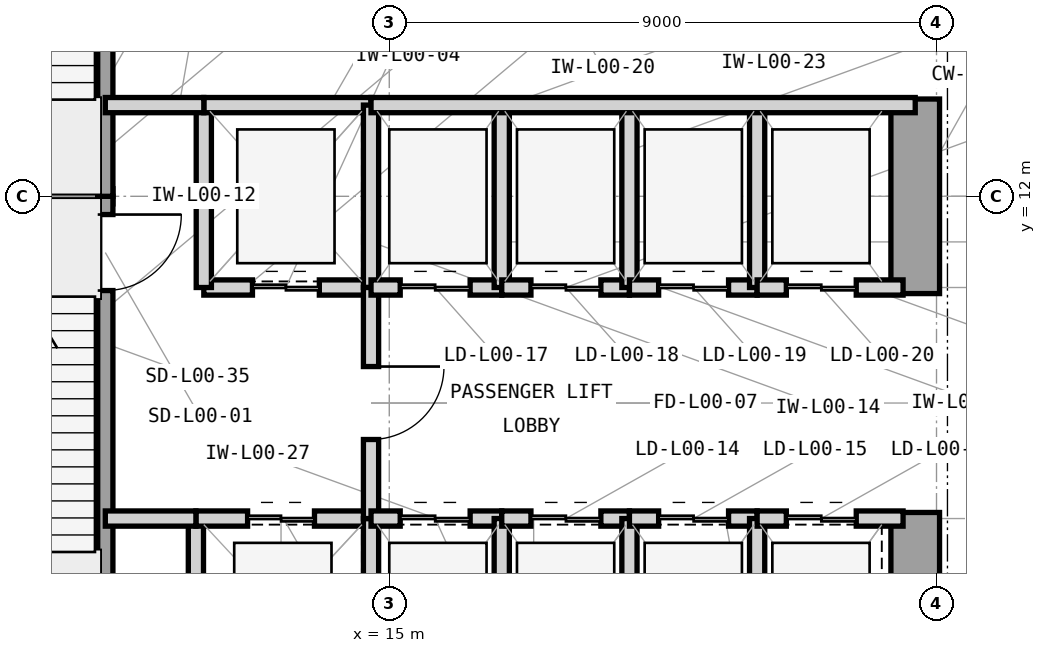
"""IFC4 building model, lengths in metres.
Left out: names, types, materials, properties, quantities, classifications, styles, units other than length and angle.
Written with IfcOpenShell. Run it as: python <this file> out.ifc"""

import sys

from ifc_helpers import new_model, si_unit, direction, frame, frame_2d, origin, place, context, subcontext, project, spatial, rectangle, extrude, element, fill, save


model = new_model("IFC4")
c1 = context("Model", 3, precision=1e-05, world=origin(), true_north=direction((0.0, 1.0)))
c2 = subcontext(c1, "Body", "Model", "MODEL_VIEW")
j1 = project(units=[si_unit("LENGTHUNIT", "METRE"), si_unit("PLANEANGLEUNIT", "RADIAN")], contexts=[c1])
p1 = place(None, origin())
s1 = spatial("IfcSite", under=j1, at=p1, CompositionType="ELEMENT")
p2 = place(p1, origin())
s2 = spatial("IfcBuilding", under=s1, at=p2, CompositionType="ELEMENT")
p3 = place(p2, origin())
s3 = spatial("IfcBuildingStorey", under=s2, at=p3, CompositionType="ELEMENT", Elevation=0.0)
p4 = place(p3, frame((23.65, 3.75, 0.0), z_axis=(0.0, 0.0, 1.0), x_axis=(0.0, 1.0, 0.0)))
e1 = element("IfcWall", 1, at=p4, inside=s3, PredefinedType="SHEAR", context=c2, shape_type="SweptSolid", body=[
    extrude(rectangle(XDim=3.05, YDim=0.8, at=frame_2d((1.525, 0.0))), origin(), (0.0, 0.0, 1.0), 5.4),
])
p5 = place(p3, frame((23.65, 10.4, 0.0), z_axis=(0.0, 0.0, 1.0), x_axis=(0.0, 1.0, 0.0)))
e2 = element("IfcWall", 2, at=p5, inside=s3, PredefinedType="SHEAR", context=c2, shape_type="SweptSolid", body=[
    extrude(rectangle(XDim=3.2, YDim=0.8, at=frame_2d((1.6, 0.0))), origin(), (0.0, 0.0, 1.0), 5.4),
])
p6 = place(p3, frame((6.35, 12.0, 0.0), z_axis=(0.0, 0.0, 1.0), x_axis=(1.0, 0.0, 0.0)))
e3 = element("IfcWall", 3, at=p6, inside=s3, PredefinedType="SHEAR", context=c2, shape_type="SweptSolid", body=[
    extrude(rectangle(XDim=4.105, YDim=0.25, at=frame_2d((2.052, 0.0))), origin(), (0.0, 0.0, 1.0), 5.4),
])
p7 = place(p3, frame((10.33, 4.55, 0.0), z_axis=(0.0, 0.0, 1.0), x_axis=(0.0, 1.0, 0.0)))
e4 = element("IfcWall", 4, at=p7, inside=s3, PredefinedType="SHEAR", context=c2, shape_type="SweptSolid", body=[
    extrude(rectangle(XDim=7.45, YDim=0.25, at=frame_2d((3.725, 0.0))), origin(), (0.0, 0.0, 1.0), 5.4),
])
p8 = place(p7, frame((5.9, 0.0, 0.0)))
e5 = element("IfcOpeningElement", 5, at=p8, cuts=e4, PredefinedType="OPENING", context=c2, shape_type="SweptSolid", body=[
    extrude(rectangle(XDim=1.25, YDim=2.2, at=frame_2d((0.625, 1.1))), frame((0.0, 0.135, 0.0), z_axis=(0.0, -1.0, 0.0), x_axis=(1.0, 0.0, 0.0)), (0.0, 0.0, 1.0), 0.27),
])
p9 = place(p3, frame((10.33, 12.0, 0.0), z_axis=(0.0, 0.0, 1.0), x_axis=(0.0, 1.0, 0.0)))
e6 = element("IfcWall", 6, at=p9, inside=s3, PredefinedType="SHEAR", context=c2, shape_type="SweptSolid", body=[
    extrude(rectangle(XDim=7.45, YDim=0.25, at=frame_2d((3.725, 0.0))), origin(), (0.0, 0.0, 1.0), 5.4),
])
p10 = place(p9, frame((5.85, 0.0, 0.0)))
e7 = element("IfcOpeningElement", 7, at=p10, cuts=e6, PredefinedType="OPENING", context=c2, shape_type="SweptSolid", body=[
    extrude(rectangle(XDim=1.25, YDim=2.2, at=frame_2d((0.625, 1.1))), frame((0.0, 0.135, 0.0), z_axis=(0.0, -1.0, 0.0), x_axis=(1.0, 0.0, 0.0)), (0.0, 0.0, 1.0), 0.27),
])
p11 = place(p3, frame((11.82, 3.35, 0.0), z_axis=(0.0, 0.0, 1.0), x_axis=(0.0, 1.0, 0.0)))
e8 = element("IfcWall", 8, at=p11, inside=s3, PredefinedType="PARTITIONING", context=c2, shape_type="SweptSolid", body=[
    extrude(rectangle(XDim=3.35, YDim=0.25, at=frame_2d((1.675, 0.0))), origin(), (0.0, 0.0, 1.0), 5.09),
])
p12 = place(p3, frame((11.82, 6.7, 0.0), z_axis=(0.0, 0.0, 1.0), x_axis=(1.0, 0.0, 0.0)))
e9 = element("IfcWall", 9, at=p12, inside=s3, PredefinedType="PARTITIONING", context=c2, shape_type="SweptSolid", body=[
    extrude(rectangle(XDim=2.88, YDim=0.25, at=frame_2d((1.44, 0.0))), origin(), (0.0, 0.0, 1.0), 4.473),
])
p13 = place(p12, frame((0.85, 0.0, 0.0)))
e10 = element("IfcOpeningElement", 10, at=p13, cuts=e9, PredefinedType="OPENING", context=c2, shape_type="SweptSolid", body=[
    extrude(rectangle(XDim=1.1, YDim=2.25, at=frame_2d((0.55, 1.125))), frame((0.0, 0.135, 0.0), z_axis=(0.0, -1.0, 0.0), x_axis=(1.0, 0.0, 0.0)), (0.0, 0.0, 1.0), 0.27),
])
p14 = place(p3, frame((14.7, 3.35, 0.0), z_axis=(0.0, 0.0, 1.0), x_axis=(0.0, 1.0, 0.0)))
e11 = element("IfcWall", 11, at=p14, inside=s3, PredefinedType="PARTITIONING", context=c2, shape_type="SweptSolid", body=[
    extrude(rectangle(XDim=3.35, YDim=0.25, at=frame_2d((1.675, 0.0))), origin(), (0.0, 0.0, 1.0), 5.09),
])
p15 = place(p3, frame((11.95, 10.5, 0.0), z_axis=(0.0, 0.0, 1.0), x_axis=(1.0, 0.0, 0.0)))
e12 = element("IfcWall", 12, at=p15, inside=s3, PredefinedType="PARTITIONING", context=c2, shape_type="SweptSolid", body=[
    extrude(rectangle(XDim=2.75, YDim=0.25, at=frame_2d((1.375, 0.0))), origin(), (0.0, 0.0, 1.0), 4.473),
])
p16 = place(p15, frame((0.8, 0.0, 0.0)))
e13 = element("IfcOpeningElement", 13, at=p16, cuts=e12, PredefinedType="OPENING", context=c2, shape_type="SweptSolid", body=[
    extrude(rectangle(XDim=1.1, YDim=2.25, at=frame_2d((0.55, 1.125))), frame((0.0, 0.135, 0.0), z_axis=(0.0, -1.0, 0.0), x_axis=(1.0, 0.0, 0.0)), (0.0, 0.0, 1.0), 0.27),
])
p17 = place(p3, frame((11.95, 10.5, 0.0), z_axis=(0.0, 0.0, 1.0), x_axis=(0.0, 1.0, 0.0)))
e14 = element("IfcWall", 14, at=p17, inside=s3, PredefinedType="PARTITIONING", context=c2, shape_type="SweptSolid", body=[
    extrude(rectangle(XDim=3.0, YDim=0.25, at=frame_2d((1.5, 0.0))), origin(), (0.0, 0.0, 1.0), 5.09),
])
p18 = place(p3, frame((11.95, 13.5, 0.0), z_axis=(0.0, 0.0, 1.0), x_axis=(1.0, 0.0, 0.0)))
e15 = element("IfcWall", 15, at=p18, inside=s3, PredefinedType="PARTITIONING", context=c2, shape_type="SweptSolid", body=[
    extrude(rectangle(XDim=2.75, YDim=0.25, at=frame_2d((1.375, 0.0))), origin(), (0.0, 0.0, 1.0), 4.473),
])
p19 = place(p3, frame((14.7, 10.5, 0.0), z_axis=(0.0, 0.0, 1.0), x_axis=(0.0, 1.0, 0.0)))
e16 = element("IfcWall", 16, at=p19, inside=s3, PredefinedType="PARTITIONING", context=c2, shape_type="SweptSolid", body=[
    extrude(rectangle(XDim=3.0, YDim=0.25, at=frame_2d((1.5, 0.0))), origin(), (0.0, 0.0, 1.0), 5.09),
])
p20 = place(p3, frame((14.7, 6.7, 0.0), z_axis=(0.0, 0.0, 1.0), x_axis=(0.0, 1.0, 0.0)))
e17 = element("IfcWall", 17, at=p20, inside=s3, PredefinedType="PARTITIONING", context=c2, shape_type="SweptSolid", body=[
    extrude(rectangle(XDim=3.8, YDim=0.25, at=frame_2d((1.9, 0.0))), origin(), (0.0, 0.0, 1.0), 5.09),
])
p21 = place(p20, frame((1.3, 0.0, 0.0)))
e18 = element("IfcOpeningElement", 18, at=p21, cuts=e17, PredefinedType="OPENING", context=c2, shape_type="SweptSolid", body=[
    extrude(rectangle(XDim=1.2, YDim=2.2, at=frame_2d((0.6, 1.1))), frame((0.0, 0.135, 0.0), z_axis=(0.0, -1.0, 0.0), x_axis=(1.0, 0.0, 0.0)), (0.0, 0.0, 1.0), 0.27),
])
p22 = place(p3, frame((10.33, 13.5, 0.0), z_axis=(0.0, 0.0, 1.0), x_axis=(1.0, 0.0, 0.0)))
e19 = element("IfcWall", 19, at=p22, inside=s3, PredefinedType="PARTITIONING", context=c2, shape_type="SweptSolid", body=[
    extrude(rectangle(XDim=1.62, YDim=0.25, at=frame_2d((0.81, 0.0))), origin(), (0.0, 0.0, 1.0), 4.473),
])
p23 = place(p3, frame((10.33, 6.7, 0.0), z_axis=(0.0, 0.0, 1.0), x_axis=(1.0, 0.0, 0.0)))
e20 = element("IfcWall", 20, at=p23, inside=s3, PredefinedType="PARTITIONING", context=c2, shape_type="SweptSolid", body=[
    extrude(rectangle(XDim=1.49, YDim=0.25, at=frame_2d((0.745, 0.0))), origin(), (0.0, 0.0, 1.0), 4.473),
])
p24 = place(p3, frame((14.7, 6.7, 0.0), z_axis=(0.0, 0.0, 1.0), x_axis=(1.0, 0.0, 0.0)))
e21 = element("IfcWall", 21, at=p24, inside=s3, PredefinedType="PARTITIONING", context=c2, shape_type="SweptSolid", body=[
    extrude(rectangle(XDim=2.15, YDim=0.25, at=frame_2d((1.075, 0.0))), origin(), (0.0, 0.0, 1.0), 4.473),
])
p25 = place(p24, frame((0.48, 0.0, 0.0)))
e22 = element("IfcOpeningElement", 22, at=p25, cuts=e21, PredefinedType="OPENING", context=c2, shape_type="SweptSolid", body=[
    extrude(rectangle(XDim=1.15, YDim=2.25, at=frame_2d((0.575, 1.125))), frame((0.0, 0.135, 0.0), z_axis=(0.0, -1.0, 0.0), x_axis=(1.0, 0.0, 0.0)), (0.0, 0.0, 1.0), 0.27),
])
p26 = place(p3, frame((16.85, 3.35, 0.0), z_axis=(0.0, 0.0, 1.0), x_axis=(0.0, 1.0, 0.0)))
e23 = element("IfcWall", 23, at=p26, inside=s3, PredefinedType="PARTITIONING", context=c2, shape_type="SweptSolid", body=[
    extrude(rectangle(XDim=3.35, YDim=0.25, at=frame_2d((1.675, 0.0))), origin(), (0.0, 0.0, 1.0), 5.09),
])
p27 = place(p3, frame((16.85, 6.7, 0.0), z_axis=(0.0, 0.0, 1.0), x_axis=(1.0, 0.0, 0.0)))
e24 = element("IfcWall", 24, at=p27, inside=s3, PredefinedType="PARTITIONING", context=c2, shape_type="SweptSolid", body=[
    extrude(rectangle(XDim=2.1, YDim=0.25, at=frame_2d((1.05, 0.0))), origin(), (0.0, 0.0, 1.0), 4.473),
])
p28 = place(p27, frame((0.48, 0.0, 0.0)))
e25 = element("IfcOpeningElement", 25, at=p28, cuts=e24, PredefinedType="OPENING", context=c2, shape_type="SweptSolid", body=[
    extrude(rectangle(XDim=1.15, YDim=2.25, at=frame_2d((0.575, 1.125))), frame((0.0, 0.135, 0.0), z_axis=(0.0, -1.0, 0.0), x_axis=(1.0, 0.0, 0.0)), (0.0, 0.0, 1.0), 0.27),
])
p29 = place(p3, frame((18.95, 3.35, 0.0), z_axis=(0.0, 0.0, 1.0), x_axis=(0.0, 1.0, 0.0)))
e26 = element("IfcWall", 26, at=p29, inside=s3, PredefinedType="PARTITIONING", context=c2, shape_type="SweptSolid", body=[
    extrude(rectangle(XDim=3.35, YDim=0.25, at=frame_2d((1.675, 0.0))), origin(), (0.0, 0.0, 1.0), 5.09),
])
p30 = place(p3, frame((18.95, 6.7, 0.0), z_axis=(0.0, 0.0, 1.0), x_axis=(1.0, 0.0, 0.0)))
e27 = element("IfcWall", 27, at=p30, inside=s3, PredefinedType="PARTITIONING", context=c2, shape_type="SweptSolid", body=[
    extrude(rectangle(XDim=2.1, YDim=0.25, at=frame_2d((1.05, 0.0))), origin(), (0.0, 0.0, 1.0), 4.473),
])
p31 = place(p30, frame((0.48, 0.0, 0.0)))
e28 = element("IfcOpeningElement", 28, at=p31, cuts=e27, PredefinedType="OPENING", context=c2, shape_type="SweptSolid", body=[
    extrude(rectangle(XDim=1.15, YDim=2.25, at=frame_2d((0.575, 1.125))), frame((0.0, 0.135, 0.0), z_axis=(0.0, -1.0, 0.0), x_axis=(1.0, 0.0, 0.0)), (0.0, 0.0, 1.0), 0.27),
])
p32 = place(p3, frame((21.05, 3.35, 0.0), z_axis=(0.0, 0.0, 1.0), x_axis=(0.0, 1.0, 0.0)))
e29 = element("IfcWall", 29, at=p32, inside=s3, PredefinedType="PARTITIONING", context=c2, shape_type="SweptSolid", body=[
    extrude(rectangle(XDim=3.35, YDim=0.25, at=frame_2d((1.675, 0.0))), origin(), (0.0, 0.0, 1.0), 5.09),
])
p33 = place(p3, frame((21.05, 6.7, 0.0), z_axis=(0.0, 0.0, 1.0), x_axis=(1.0, 0.0, 0.0)))
e30 = element("IfcWall", 30, at=p33, inside=s3, PredefinedType="PARTITIONING", context=c2, shape_type="SweptSolid", body=[
    extrude(rectangle(XDim=2.4, YDim=0.25, at=frame_2d((1.2, 0.0))), origin(), (0.0, 0.0, 1.0), 4.473),
])
p34 = place(p33, frame((0.48, 0.0, 0.0)))
e31 = element("IfcOpeningElement", 31, at=p34, cuts=e30, PredefinedType="OPENING", context=c2, shape_type="SweptSolid", body=[
    extrude(rectangle(XDim=1.15, YDim=2.25, at=frame_2d((0.575, 1.125))), frame((0.0, 0.135, 0.0), z_axis=(0.0, -1.0, 0.0), x_axis=(1.0, 0.0, 0.0)), (0.0, 0.0, 1.0), 0.27),
])
p35 = place(p3, frame((14.7, 10.5, 0.0), z_axis=(0.0, 0.0, 1.0), x_axis=(1.0, 0.0, 0.0)))
e32 = element("IfcWall", 32, at=p35, inside=s3, PredefinedType="PARTITIONING", context=c2, shape_type="SweptSolid", body=[
    extrude(rectangle(XDim=2.15, YDim=0.25, at=frame_2d((1.075, 0.0))), origin(), (0.0, 0.0, 1.0), 4.473),
])
p36 = place(p35, frame((0.48, 0.0, 0.0)))
e33 = element("IfcOpeningElement", 33, at=p36, cuts=e32, PredefinedType="OPENING", context=c2, shape_type="SweptSolid", body=[
    extrude(rectangle(XDim=1.15, YDim=2.25, at=frame_2d((0.575, 1.125))), frame((0.0, 0.135, 0.0), z_axis=(0.0, -1.0, 0.0), x_axis=(1.0, 0.0, 0.0)), (0.0, 0.0, 1.0), 0.27),
])
p37 = place(p3, frame((16.85, 10.5, 0.0), z_axis=(0.0, 0.0, 1.0), x_axis=(0.0, 1.0, 0.0)))
e34 = element("IfcWall", 34, at=p37, inside=s3, PredefinedType="PARTITIONING", context=c2, shape_type="SweptSolid", body=[
    extrude(rectangle(XDim=3.0, YDim=0.25, at=frame_2d((1.5, 0.0))), origin(), (0.0, 0.0, 1.0), 5.09),
])
p38 = place(p3, frame((16.85, 10.5, 0.0), z_axis=(0.0, 0.0, 1.0), x_axis=(1.0, 0.0, 0.0)))
e35 = element("IfcWall", 35, at=p38, inside=s3, PredefinedType="PARTITIONING", context=c2, shape_type="SweptSolid", body=[
    extrude(rectangle(XDim=2.1, YDim=0.25, at=frame_2d((1.05, 0.0))), origin(), (0.0, 0.0, 1.0), 4.473),
])
p39 = place(p38, frame((0.48, 0.0, 0.0)))
e36 = element("IfcOpeningElement", 36, at=p39, cuts=e35, PredefinedType="OPENING", context=c2, shape_type="SweptSolid", body=[
    extrude(rectangle(XDim=1.15, YDim=2.25, at=frame_2d((0.575, 1.125))), frame((0.0, 0.135, 0.0), z_axis=(0.0, -1.0, 0.0), x_axis=(1.0, 0.0, 0.0)), (0.0, 0.0, 1.0), 0.27),
])
p40 = place(p3, frame((18.95, 10.5, 0.0), z_axis=(0.0, 0.0, 1.0), x_axis=(0.0, 1.0, 0.0)))
e37 = element("IfcWall", 37, at=p40, inside=s3, PredefinedType="PARTITIONING", context=c2, shape_type="SweptSolid", body=[
    extrude(rectangle(XDim=3.0, YDim=0.25, at=frame_2d((1.5, 0.0))), origin(), (0.0, 0.0, 1.0), 5.09),
])
p41 = place(p3, frame((18.95, 10.5, 0.0), z_axis=(0.0, 0.0, 1.0), x_axis=(1.0, 0.0, 0.0)))
e38 = element("IfcWall", 38, at=p41, inside=s3, PredefinedType="PARTITIONING", context=c2, shape_type="SweptSolid", body=[
    extrude(rectangle(XDim=2.1, YDim=0.25, at=frame_2d((1.05, 0.0))), origin(), (0.0, 0.0, 1.0), 4.473),
])
p42 = place(p41, frame((0.48, 0.0, 0.0)))
e39 = element("IfcOpeningElement", 39, at=p42, cuts=e38, PredefinedType="OPENING", context=c2, shape_type="SweptSolid", body=[
    extrude(rectangle(XDim=1.15, YDim=2.25, at=frame_2d((0.575, 1.125))), frame((0.0, 0.135, 0.0), z_axis=(0.0, -1.0, 0.0), x_axis=(1.0, 0.0, 0.0)), (0.0, 0.0, 1.0), 0.27),
])
p43 = place(p3, frame((21.05, 10.5, 0.0), z_axis=(0.0, 0.0, 1.0), x_axis=(0.0, 1.0, 0.0)))
e40 = element("IfcWall", 40, at=p43, inside=s3, PredefinedType="PARTITIONING", context=c2, shape_type="SweptSolid", body=[
    extrude(rectangle(XDim=3.0, YDim=0.25, at=frame_2d((1.5, 0.0))), origin(), (0.0, 0.0, 1.0), 5.09),
])
p44 = place(p3, frame((21.05, 10.5, 0.0), z_axis=(0.0, 0.0, 1.0), x_axis=(1.0, 0.0, 0.0)))
e41 = element("IfcWall", 41, at=p44, inside=s3, PredefinedType="PARTITIONING", context=c2, shape_type="SweptSolid", body=[
    extrude(rectangle(XDim=2.4, YDim=0.25, at=frame_2d((1.2, 0.0))), origin(), (0.0, 0.0, 1.0), 4.473),
])
p45 = place(p44, frame((0.48, 0.0, 0.0)))
e42 = element("IfcOpeningElement", 42, at=p45, cuts=e41, PredefinedType="OPENING", context=c2, shape_type="SweptSolid", body=[
    extrude(rectangle(XDim=1.15, YDim=2.25, at=frame_2d((0.575, 1.125))), frame((0.0, 0.135, 0.0), z_axis=(0.0, -1.0, 0.0), x_axis=(1.0, 0.0, 0.0)), (0.0, 0.0, 1.0), 0.27),
])
p46 = place(p3, frame((14.7, 13.5, 0.0), z_axis=(0.0, 0.0, 1.0), x_axis=(1.0, 0.0, 0.0)))
e43 = element("IfcWall", 43, at=p46, inside=s3, PredefinedType="PARTITIONING", context=c2, shape_type="SweptSolid", body=[
    extrude(rectangle(XDim=8.95, YDim=0.25, at=frame_2d((4.475, 0.0))), origin(), (0.0, 0.0, 1.0), 4.473),
])
p47 = place(p8, frame((1.25, 0.0, 0.0), z_axis=(0.0, 0.0, 1.0), x_axis=(-1.0, 0.0, 0.0)))
e44 = element("IfcDoor", 44, at=p47, inside=s3, OperationType="SINGLE_SWING_LEFT", PredefinedType="DOOR", context=c2, shape_type="SweptSolid", body=[
    extrude(rectangle(XDim=1.25, YDim=2.2, at=frame_2d((0.625, 1.1))), frame((0.0, 0.025, 0.0), z_axis=(0.0, -1.0, 0.0), x_axis=(1.0, 0.0, 0.0)), (0.0, 0.0, 1.0), 0.05),
])
fill(e5, e44)
p48 = place(p13, origin())
e45 = element("IfcDoor", 45, at=p48, inside=s3, OperationType="DOUBLE_DOOR_SLIDING", PredefinedType="DOOR", context=c2, shape_type="SweptSolid", body=[
    extrude(rectangle(XDim=1.1, YDim=2.25, at=frame_2d((0.55, 1.125))), frame((0.0, 0.025, 0.0), z_axis=(0.0, -1.0, 0.0), x_axis=(1.0, 0.0, 0.0)), (0.0, 0.0, 1.0), 0.05),
])
fill(e10, e45)
p49 = place(p16, origin())
e46 = element("IfcDoor", 46, at=p49, inside=s3, OperationType="DOUBLE_DOOR_SLIDING", PredefinedType="DOOR", context=c2, shape_type="SweptSolid", body=[
    extrude(rectangle(XDim=1.1, YDim=2.25, at=frame_2d((0.55, 1.125))), frame((0.0, 0.025, 0.0), z_axis=(0.0, -1.0, 0.0), x_axis=(1.0, 0.0, 0.0)), (0.0, 0.0, 1.0), 0.05),
])
fill(e13, e46)
p50 = place(p21, frame((1.2, 0.0, 0.0), z_axis=(0.0, 0.0, 1.0), x_axis=(-1.0, 0.0, 0.0)))
e47 = element("IfcDoor", 47, at=p50, inside=s3, OperationType="SINGLE_SWING_LEFT", PredefinedType="DOOR", context=c2, shape_type="SweptSolid", body=[
    extrude(rectangle(XDim=1.2, YDim=2.2, at=frame_2d((0.6, 1.1))), frame((0.0, 0.025, 0.0), z_axis=(0.0, -1.0, 0.0), x_axis=(1.0, 0.0, 0.0)), (0.0, 0.0, 1.0), 0.05),
])
fill(e18, e47)
p51 = place(p25, origin())
e48 = element("IfcDoor", 48, at=p51, inside=s3, OperationType="DOUBLE_DOOR_SLIDING", PredefinedType="DOOR", context=c2, shape_type="SweptSolid", body=[
    extrude(rectangle(XDim=1.15, YDim=2.25, at=frame_2d((0.575, 1.125))), frame((0.0, 0.025, 0.0), z_axis=(0.0, -1.0, 0.0), x_axis=(1.0, 0.0, 0.0)), (0.0, 0.0, 1.0), 0.05),
])
fill(e22, e48)
p52 = place(p28, origin())
e49 = element("IfcDoor", 49, at=p52, inside=s3, OperationType="DOUBLE_DOOR_SLIDING", PredefinedType="DOOR", context=c2, shape_type="SweptSolid", body=[
    extrude(rectangle(XDim=1.15, YDim=2.25, at=frame_2d((0.575, 1.125))), frame((0.0, 0.025, 0.0), z_axis=(0.0, -1.0, 0.0), x_axis=(1.0, 0.0, 0.0)), (0.0, 0.0, 1.0), 0.05),
])
fill(e25, e49)
p53 = place(p31, origin())
e50 = element("IfcDoor", 50, at=p53, inside=s3, OperationType="DOUBLE_DOOR_SLIDING", PredefinedType="DOOR", context=c2, shape_type="SweptSolid", body=[
    extrude(rectangle(XDim=1.15, YDim=2.25, at=frame_2d((0.575, 1.125))), frame((0.0, 0.025, 0.0), z_axis=(0.0, -1.0, 0.0), x_axis=(1.0, 0.0, 0.0)), (0.0, 0.0, 1.0), 0.05),
])
fill(e28, e50)
p54 = place(p34, origin())
e51 = element("IfcDoor", 51, at=p54, inside=s3, OperationType="DOUBLE_DOOR_SLIDING", PredefinedType="DOOR", context=c2, shape_type="SweptSolid", body=[
    extrude(rectangle(XDim=1.15, YDim=2.25, at=frame_2d((0.575, 1.125))), frame((0.0, 0.025, 0.0), z_axis=(0.0, -1.0, 0.0), x_axis=(1.0, 0.0, 0.0)), (0.0, 0.0, 1.0), 0.05),
])
fill(e31, e51)
p55 = place(p36, origin())
e52 = element("IfcDoor", 52, at=p55, inside=s3, OperationType="DOUBLE_DOOR_SLIDING", PredefinedType="DOOR", context=c2, shape_type="SweptSolid", body=[
    extrude(rectangle(XDim=1.15, YDim=2.25, at=frame_2d((0.575, 1.125))), frame((0.0, 0.025, 0.0), z_axis=(0.0, -1.0, 0.0), x_axis=(1.0, 0.0, 0.0)), (0.0, 0.0, 1.0), 0.05),
])
fill(e33, e52)
p56 = place(p39, origin())
e53 = element("IfcDoor", 53, at=p56, inside=s3, OperationType="DOUBLE_DOOR_SLIDING", PredefinedType="DOOR", context=c2, shape_type="SweptSolid", body=[
    extrude(rectangle(XDim=1.15, YDim=2.25, at=frame_2d((0.575, 1.125))), frame((0.0, 0.025, 0.0), z_axis=(0.0, -1.0, 0.0), x_axis=(1.0, 0.0, 0.0)), (0.0, 0.0, 1.0), 0.05),
])
fill(e36, e53)
p57 = place(p42, origin())
e54 = element("IfcDoor", 54, at=p57, inside=s3, OperationType="DOUBLE_DOOR_SLIDING", PredefinedType="DOOR", context=c2, shape_type="SweptSolid", body=[
    extrude(rectangle(XDim=1.15, YDim=2.25, at=frame_2d((0.575, 1.125))), frame((0.0, 0.025, 0.0), z_axis=(0.0, -1.0, 0.0), x_axis=(1.0, 0.0, 0.0)), (0.0, 0.0, 1.0), 0.05),
])
fill(e39, e54)
p58 = place(p45, origin())
e55 = element("IfcDoor", 55, at=p58, inside=s3, OperationType="DOUBLE_DOOR_SLIDING", PredefinedType="DOOR", context=c2, shape_type="SweptSolid", body=[
    extrude(rectangle(XDim=1.15, YDim=2.25, at=frame_2d((0.575, 1.125))), frame((0.0, 0.025, 0.0), z_axis=(0.0, -1.0, 0.0), x_axis=(1.0, 0.0, 0.0)), (0.0, 0.0, 1.0), 0.05),
])
fill(e42, e55)
save(model, sys.argv[1])
